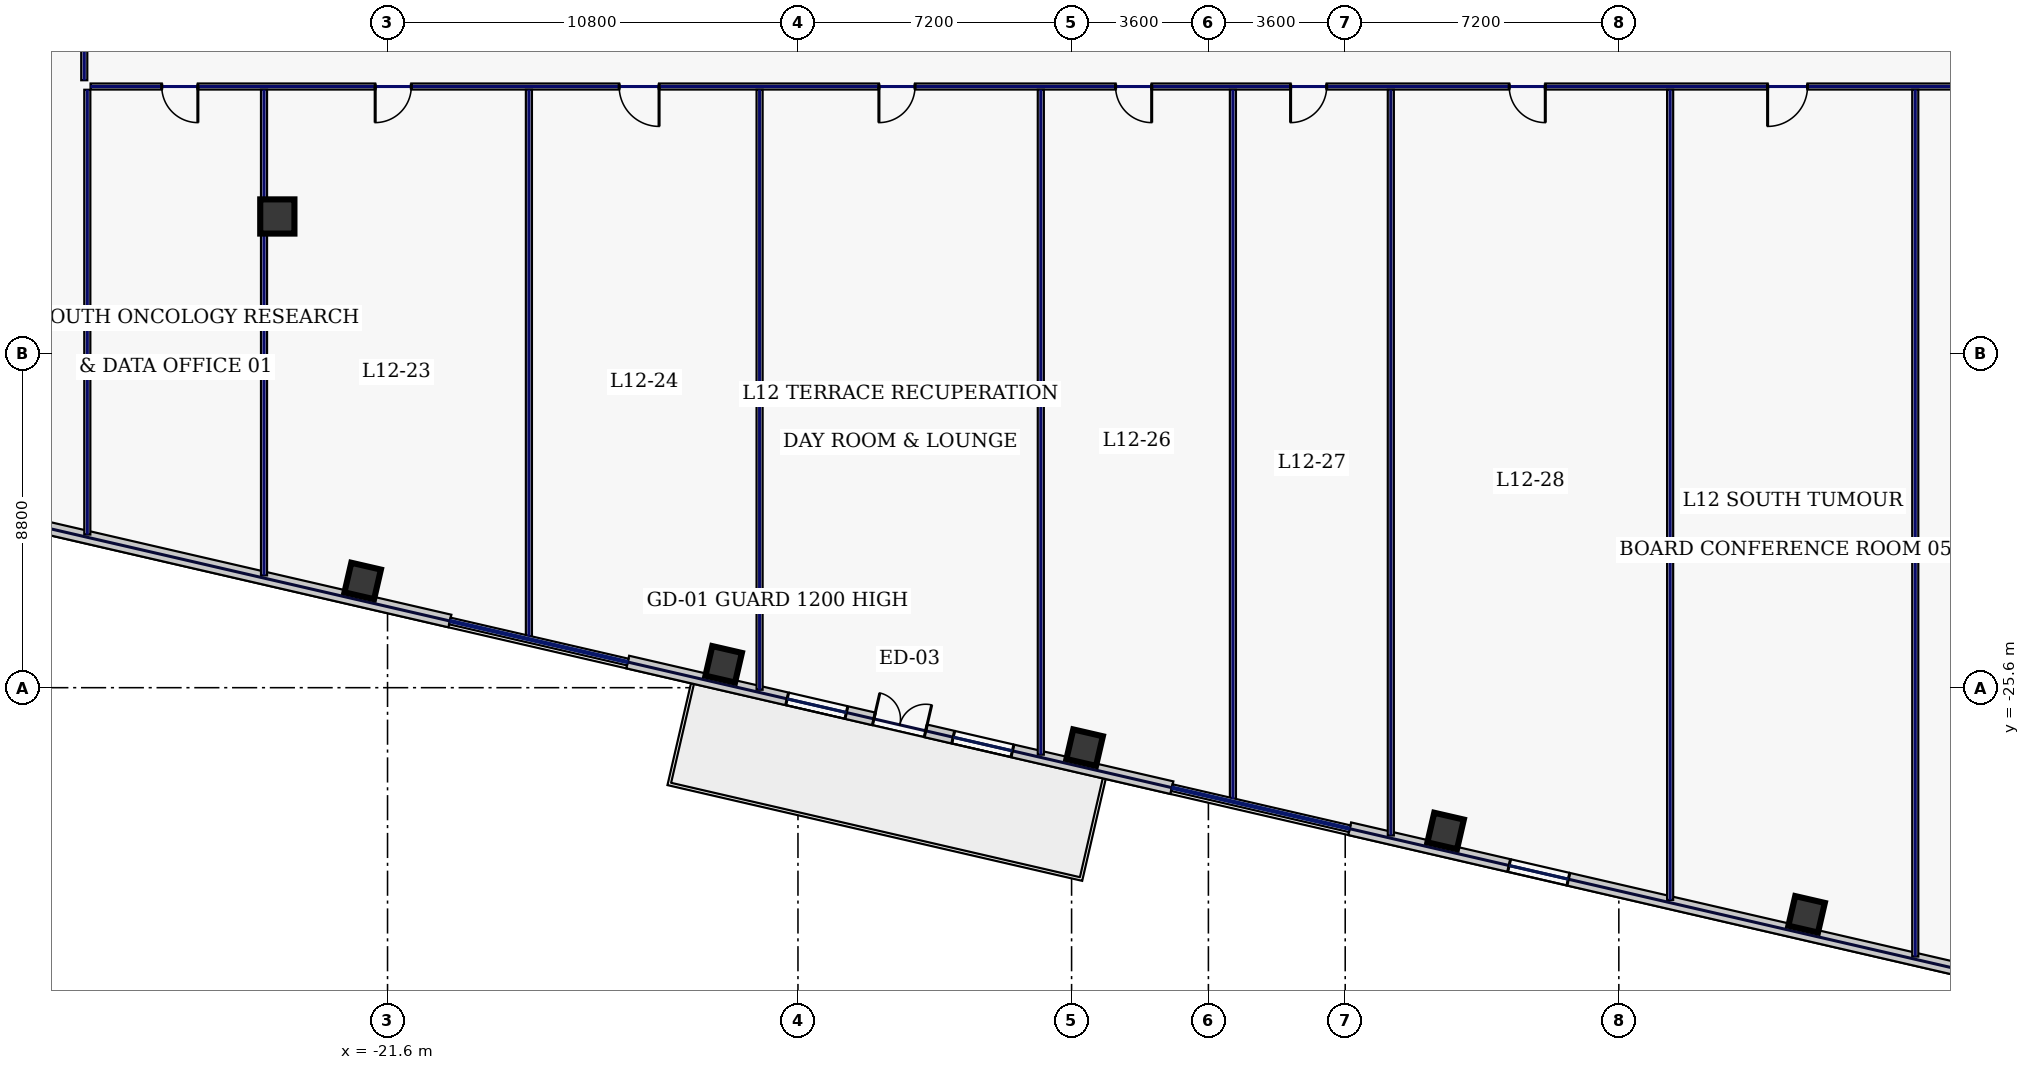
"""IFC4 building model, lengths in metres.
Left out: names, types, materials, properties, quantities, classifications, styles, units other than length and angle.
Written with IfcOpenShell. Run it as: python <this file> out.ifc"""

import sys

from ifc_helpers import new_model, si_unit, direction, frame, frame_2d, origin, origin_2d, place, context, subcontext, project, spatial, rectangle, hollow_rectangle, extrude, element, fill, save


model = new_model("IFC4")
c1 = context("Model", 3, precision=1e-05, world=origin(), true_north=direction((0.0, 1.0)))
c2 = subcontext(c1, "Body", "Model", "MODEL_VIEW")
j1 = project(units=[si_unit("LENGTHUNIT", "METRE"), si_unit("PLANEANGLEUNIT", "RADIAN")], contexts=[c1])
p1 = place(None, origin())
s1 = spatial("IfcSite", under=j1, at=p1, CompositionType="ELEMENT")
p2 = place(p1, origin())
s2 = spatial("IfcBuilding", under=s1, at=p2, CompositionType="ELEMENT")
p3 = place(p2, frame((0.0, 0.0, 59.4)))
s3 = spatial("IfcBuildingStorey", under=s2, at=p3, CompositionType="ELEMENT", Elevation=59.4)
p4 = place(p3, frame((-24.5, -13.2, 0.0), z_axis=(0.0, 0.0, 1.0), x_axis=(1.0, 0.0, 0.0)))
e1 = element("IfcColumn", 1, at=p4, inside=s3, PredefinedType="COLUMN", context=c2, shape_type="SweptSolid", body=[
    extrude(hollow_rectangle(XDim=0.9, YDim=0.9, WallThickness=0.04, at=origin_2d()), origin(), (0.0, 0.0, 1.0), 3.74),
])
for number, where, z_axis, x_axis in (
    (2, (-22.254, -22.792, 0.0), (0.0, 0.0, 1.0), (0.974, -0.225, 0.0)),
    (3, (-12.755, -24.985, 0.0), (0.0, 0.0, 1.0), (0.974, -0.225, 0.0)),
    (4, (-3.256, -27.178, 0.0), (0.0, 0.0, 1.0), (0.974, -0.225, 0.0)),
    (5, (6.242, -29.371, 0.0), (0.0, 0.0, 1.0), (0.974, -0.225, 0.0)),
    (6, (15.741, -31.564, 0.0), (0.0, 0.0, 1.0), (0.974, -0.225, 0.0)),
):
    element("IfcColumn", number, at=place(p3, frame(where, z_axis=z_axis, x_axis=x_axis)), inside=s3, PredefinedType="COLUMN", context=c2, shape_type="SweptSolid", body=[
        extrude(hollow_rectangle(XDim=0.8, YDim=0.8, WallThickness=0.036, at=origin_2d()), origin(), (0.0, 0.0, 1.0), 3.74),
    ])
p5 = place(p3, frame((-42.029, -18.75, 0.0), z_axis=(0.0, 0.0, 1.0), x_axis=(0.97436993772, -0.224951604723, 0.0)))
e7 = element("IfcWall", 7, at=p5, inside=s3, PredefinedType="STANDARD", context=c2, shape_type="SweptSolid", body=[
    extrude(rectangle(XDim=22.651, YDim=0.34, at=frame_2d((11.326, 0.0))), origin(), (0.0, 0.0, 1.0), 3.74),
])
p6 = place(p5, frame((2.512, 0.0, 0.22)))
e8 = element("IfcOpeningElement", 8, at=p6, cuts=e7, PredefinedType="OPENING", context=c2, shape_type="SweptSolid", body=[
    extrude(rectangle(XDim=1.6, YDim=1.2, at=frame_2d((0.8, 0.6))), frame((0.0, 0.18, 0.0), z_axis=(0.0, -1.0, 0.0), x_axis=(1.0, 0.0, 0.0)), (0.0, 0.0, 1.0), 0.36),
])
p7 = place(p5, frame((6.997, 0.0, 0.22)))
e9 = element("IfcOpeningElement", 9, at=p7, cuts=e7, PredefinedType="OPENING", context=c2, shape_type="SweptSolid", body=[
    extrude(rectangle(XDim=1.6, YDim=1.2, at=frame_2d((0.8, 0.6))), frame((0.0, 0.18, 0.0), z_axis=(0.0, -1.0, 0.0), x_axis=(1.0, 0.0, 0.0)), (0.0, 0.0, 1.0), 0.36),
])
p8 = place(p3, frame((-15.281, -24.925, 0.0), z_axis=(0.0, 0.0, 1.0), x_axis=(0.974370193991, -0.22495049469, 0.0)))
e10 = element("IfcWall", 10, at=p8, inside=s3, PredefinedType="STANDARD", context=c2, shape_type="SweptSolid", body=[
    extrude(rectangle(XDim=14.697, YDim=0.34, at=frame_2d((7.349, 0.0))), origin(), (0.0, 0.0, 1.0), 3.74),
])
p9 = place(p8, frame((6.649, 0.0, 0.0)))
e11 = element("IfcOpeningElement", 11, at=p9, cuts=e10, PredefinedType="OPENING", context=c2, shape_type="SweptSolid", body=[
    extrude(rectangle(XDim=1.4, YDim=2.2, at=frame_2d((0.7, 1.1))), frame((0.0, 0.18, 0.0), z_axis=(0.0, -1.0, 0.0), x_axis=(1.0, 0.0, 0.0)), (0.0, 0.0, 1.0), 0.36),
])
p10 = place(p8, frame((4.306, 0.0, 0.22)))
e12 = element("IfcOpeningElement", 12, at=p10, cuts=e10, PredefinedType="OPENING", context=c2, shape_type="SweptSolid", body=[
    extrude(rectangle(XDim=1.6, YDim=1.2, at=frame_2d((0.8, 0.6))), frame((0.0, 0.18, 0.0), z_axis=(0.0, -1.0, 0.0), x_axis=(1.0, 0.0, 0.0)), (0.0, 0.0, 1.0), 0.36),
])
p11 = place(p8, frame((8.791, 0.0, 0.22)))
e13 = element("IfcOpeningElement", 13, at=p11, cuts=e10, PredefinedType="OPENING", context=c2, shape_type="SweptSolid", body=[
    extrude(rectangle(XDim=1.6, YDim=1.2, at=frame_2d((0.8, 0.6))), frame((0.0, 0.18, 0.0), z_axis=(0.0, -1.0, 0.0), x_axis=(1.0, 0.0, 0.0)), (0.0, 0.0, 1.0), 0.36),
])
p12 = place(p3, frame((3.717, -29.311, 0.0), z_axis=(0.0, 0.0, 1.0), x_axis=(0.97436993772, -0.224951604723, 0.0)))
e14 = element("IfcWall", 14, at=p12, inside=s3, PredefinedType="STANDARD", context=c2, shape_type="SweptSolid", body=[
    extrude(rectangle(XDim=22.651, YDim=0.34, at=frame_2d((11.326, 0.0))), origin(), (0.0, 0.0, 1.0), 3.74),
])
p13 = place(p12, frame((4.306, 0.0, 0.22)))
e15 = element("IfcOpeningElement", 15, at=p13, cuts=e14, PredefinedType="OPENING", context=c2, shape_type="SweptSolid", body=[
    extrude(rectangle(XDim=1.6, YDim=1.2, at=frame_2d((0.8, 0.6))), frame((0.0, 0.18, 0.0), z_axis=(0.0, -1.0, 0.0), x_axis=(1.0, 0.0, 0.0)), (0.0, 0.0, 1.0), 0.36),
])
p14 = place(p12, frame((18.539, 0.0, 0.22)))
e16 = element("IfcOpeningElement", 16, at=p14, cuts=e14, PredefinedType="OPENING", context=c2, shape_type="SweptSolid", body=[
    extrude(rectangle(XDim=1.6, YDim=1.2, at=frame_2d((0.8, 0.6))), frame((0.0, 0.18, 0.0), z_axis=(0.0, -1.0, 0.0), x_axis=(1.0, 0.0, 0.0)), (0.0, 0.0, 1.0), 0.36),
])
p15 = place(p3, frame((-29.58, -9.615, 0.0), z_axis=(0.0, 0.0, 1.0), x_axis=(0.0, 1.0, 0.0)))
e17 = element("IfcWall", 17, at=p15, inside=s3, PredefinedType="PARTITIONING", context=c2, shape_type="SweptSolid", body=[
    extrude(rectangle(XDim=19.28, YDim=0.16, at=frame_2d((9.64, 0.0))), origin(), (0.0, 0.0, 1.0), 3.74),
])
p16 = place(p15, frame((1.969, 0.0, 0.0)))
e18 = element("IfcOpeningElement", 18, at=p16, cuts=e17, PredefinedType="OPENING", context=c2, shape_type="SweptSolid", body=[
    extrude(rectangle(XDim=0.95, YDim=2.2, at=frame_2d((0.475, 1.1))), frame((0.0, 0.09, 0.0), z_axis=(0.0, -1.0, 0.0), x_axis=(1.0, 0.0, 0.0)), (0.0, 0.0, 1.0), 0.18),
])
p17 = place(p15, frame((6.625, 0.0, 0.0)))
e19 = element("IfcOpeningElement", 19, at=p17, cuts=e17, PredefinedType="OPENING", context=c2, shape_type="SweptSolid", body=[
    extrude(rectangle(XDim=0.95, YDim=2.2, at=frame_2d((0.475, 1.1))), frame((0.0, 0.09, 0.0), z_axis=(0.0, -1.0, 0.0), x_axis=(1.0, 0.0, 0.0)), (0.0, 0.0, 1.0), 0.18),
])
p18 = place(p15, frame((11.825, 0.0, 0.0)))
e20 = element("IfcOpeningElement", 20, at=p18, cuts=e17, PredefinedType="OPENING", context=c2, shape_type="SweptSolid", body=[
    extrude(rectangle(XDim=0.95, YDim=2.2, at=frame_2d((0.475, 1.1))), frame((0.0, 0.09, 0.0), z_axis=(0.0, -1.0, 0.0), x_axis=(1.0, 0.0, 0.0)), (0.0, 0.0, 1.0), 0.18),
])
p19 = place(p15, frame((16.506, 0.0, 0.0)))
e21 = element("IfcOpeningElement", 21, at=p19, cuts=e17, PredefinedType="OPENING", context=c2, shape_type="SweptSolid", body=[
    extrude(rectangle(XDim=0.95, YDim=2.2, at=frame_2d((0.475, 1.1))), frame((0.0, 0.09, 0.0), z_axis=(0.0, -1.0, 0.0), x_axis=(1.0, 0.0, 0.0)), (0.0, 0.0, 1.0), 0.18),
])
p20 = place(p3, frame((29.415, -9.78, 0.0), z_axis=(0.0, 0.0, 1.0), x_axis=(-1.0, 0.0, 0.0)))
e22 = element("IfcWall", 22, at=p20, inside=s3, PredefinedType="PARTITIONING", context=c2, shape_type="SweptSolid", body=[
    extrude(rectangle(XDim=58.83, YDim=0.16, at=frame_2d((29.415, 0.0))), origin(), (0.0, 0.0, 1.0), 3.74),
])
p21 = place(p20, frame((56.006, 0.0, 0.0)))
e23 = element("IfcOpeningElement", 23, at=p21, cuts=e22, PredefinedType="OPENING", context=c2, shape_type="SweptSolid", body=[
    extrude(rectangle(XDim=0.95, YDim=2.2, at=frame_2d((0.475, 1.1))), frame((0.0, 0.09, 0.0), z_axis=(0.0, -1.0, 0.0), x_axis=(1.0, 0.0, 0.0)), (0.0, 0.0, 1.0), 0.18),
])
p22 = place(p20, frame((50.39, 0.0, 0.0)))
e24 = element("IfcOpeningElement", 24, at=p22, cuts=e22, PredefinedType="OPENING", context=c2, shape_type="SweptSolid", body=[
    extrude(rectangle(XDim=0.95, YDim=2.2, at=frame_2d((0.475, 1.1))), frame((0.0, 0.09, 0.0), z_axis=(0.0, -1.0, 0.0), x_axis=(1.0, 0.0, 0.0)), (0.0, 0.0, 1.0), 0.18),
])
p23 = place(p20, frame((43.87, 0.0, 0.0)))
e25 = element("IfcOpeningElement", 25, at=p23, cuts=e22, PredefinedType="OPENING", context=c2, shape_type="SweptSolid", body=[
    extrude(rectangle(XDim=1.05, YDim=2.2, at=frame_2d((0.525, 1.1))), frame((0.0, 0.09, 0.0), z_axis=(0.0, -1.0, 0.0), x_axis=(1.0, 0.0, 0.0)), (0.0, 0.0, 1.0), 0.18),
])
p24 = place(p20, frame((37.135, 0.0, 0.0)))
e26 = element("IfcOpeningElement", 26, at=p24, cuts=e22, PredefinedType="OPENING", context=c2, shape_type="SweptSolid", body=[
    extrude(rectangle(XDim=0.95, YDim=2.2, at=frame_2d((0.475, 1.1))), frame((0.0, 0.09, 0.0), z_axis=(0.0, -1.0, 0.0), x_axis=(1.0, 0.0, 0.0)), (0.0, 0.0, 1.0), 0.18),
])
p25 = place(p20, frame((30.907, 0.0, 0.0)))
e27 = element("IfcOpeningElement", 27, at=p25, cuts=e22, PredefinedType="OPENING", context=c2, shape_type="SweptSolid", body=[
    extrude(rectangle(XDim=0.95, YDim=2.2, at=frame_2d((0.475, 1.1))), frame((0.0, 0.09, 0.0), z_axis=(0.0, -1.0, 0.0), x_axis=(1.0, 0.0, 0.0)), (0.0, 0.0, 1.0), 0.18),
])
p26 = place(p20, frame((26.302, 0.0, 0.0)))
e28 = element("IfcOpeningElement", 28, at=p26, cuts=e22, PredefinedType="OPENING", context=c2, shape_type="SweptSolid", body=[
    extrude(rectangle(XDim=0.95, YDim=2.2, at=frame_2d((0.475, 1.1))), frame((0.0, 0.09, 0.0), z_axis=(0.0, -1.0, 0.0), x_axis=(1.0, 0.0, 0.0)), (0.0, 0.0, 1.0), 0.18),
])
p27 = place(p20, frame((20.55, 0.0, 0.0)))
e29 = element("IfcOpeningElement", 29, at=p27, cuts=e22, PredefinedType="OPENING", context=c2, shape_type="SweptSolid", body=[
    extrude(rectangle(XDim=0.95, YDim=2.2, at=frame_2d((0.475, 1.1))), frame((0.0, 0.09, 0.0), z_axis=(0.0, -1.0, 0.0), x_axis=(1.0, 0.0, 0.0)), (0.0, 0.0, 1.0), 0.18),
])
p28 = place(p20, frame((13.65, 0.0, 0.0)))
e30 = element("IfcOpeningElement", 30, at=p28, cuts=e22, PredefinedType="OPENING", context=c2, shape_type="SweptSolid", body=[
    extrude(rectangle(XDim=1.05, YDim=2.2, at=frame_2d((0.525, 1.1))), frame((0.0, 0.09, 0.0), z_axis=(0.0, -1.0, 0.0), x_axis=(1.0, 0.0, 0.0)), (0.0, 0.0, 1.0), 0.18),
])
p29 = place(p20, frame((7.3, 0.0, 0.0)))
e31 = element("IfcOpeningElement", 31, at=p29, cuts=e22, PredefinedType="OPENING", context=c2, shape_type="SweptSolid", body=[
    extrude(rectangle(XDim=0.95, YDim=2.2, at=frame_2d((0.475, 1.1))), frame((0.0, 0.09, 0.0), z_axis=(0.0, -1.0, 0.0), x_axis=(1.0, 0.0, 0.0)), (0.0, 0.0, 1.0), 0.18),
])
p30 = place(p20, frame((2.044, 0.0, 0.0)))
e32 = element("IfcOpeningElement", 32, at=p30, cuts=e22, PredefinedType="OPENING", context=c2, shape_type="SweptSolid", body=[
    extrude(rectangle(XDim=1.15, YDim=2.2, at=frame_2d((0.575, 1.1))), frame((0.0, 0.09, 0.0), z_axis=(0.0, -1.0, 0.0), x_axis=(1.0, 0.0, 0.0)), (0.0, 0.0, 1.0), 0.18),
])
p31 = place(p3, frame((-29.5, -21.571, 0.0), z_axis=(0.0, 0.0, 1.0), x_axis=(0.0, 1.0, 0.0)))
e33 = element("IfcWall", 33, at=p31, inside=s3, PredefinedType="PARTITIONING", context=c2, shape_type="SweptSolid", body=[
    extrude(rectangle(XDim=11.706, YDim=0.16, at=frame_2d((5.853, 0.0))), origin(), (0.0, 0.0, 1.0), 3.74),
])
p32 = place(p3, frame((-24.85, -22.644, 0.0), z_axis=(0.0, 0.0, 1.0), x_axis=(0.0, 1.0, 0.0)))
e34 = element("IfcWall", 34, at=p32, inside=s3, PredefinedType="PARTITIONING", context=c2, shape_type="SweptSolid", body=[
    extrude(rectangle(XDim=12.779, YDim=0.16, at=frame_2d((6.39, 0.0))), origin(), (0.0, 0.0, 1.0), 3.74),
])
p33 = place(p3, frame((-11.81, -25.655, 0.0), z_axis=(0.0, 0.0, 1.0), x_axis=(0.0, 1.0, 0.0)))
e35 = element("IfcWall", 35, at=p33, inside=s3, PredefinedType="PARTITIONING", context=c2, shape_type="SweptSolid", body=[
    extrude(rectangle(XDim=15.79, YDim=0.16, at=frame_2d((7.895, 0.0))), origin(), (0.0, 0.0, 1.0), 3.74),
])
p34 = place(p3, frame((-4.41, -27.363, 0.0), z_axis=(0.0, 0.0, 1.0), x_axis=(0.0, 1.0, 0.0)))
e36 = element("IfcWall", 36, at=p34, inside=s3, PredefinedType="PARTITIONING", context=c2, shape_type="SweptSolid", body=[
    extrude(rectangle(XDim=17.498, YDim=0.16, at=frame_2d((8.749, 0.0))), origin(), (0.0, 0.0, 1.0), 3.74),
])
p35 = place(p3, frame((4.8, -29.489, 0.0), z_axis=(0.0, 0.0, 1.0), x_axis=(0.0, 1.0, 0.0)))
e37 = element("IfcWall", 37, at=p35, inside=s3, PredefinedType="PARTITIONING", context=c2, shape_type="SweptSolid", body=[
    extrude(rectangle(XDim=19.624, YDim=0.16, at=frame_2d((9.812, 0.0))), origin(), (0.0, 0.0, 1.0), 3.235),
])
p36 = place(p3, frame((18.6, -32.675, 0.0), z_axis=(0.0, 0.0, 1.0), x_axis=(0.0, 1.0, 0.0)))
e38 = element("IfcWall", 38, at=p36, inside=s3, PredefinedType="PARTITIONING", context=c2, shape_type="SweptSolid", body=[
    extrude(rectangle(XDim=22.81, YDim=0.16, at=frame_2d((11.405, 0.0))), origin(), (0.0, 0.0, 1.0), 3.74),
])
p37 = place(p3, frame((-17.88, -24.253, 0.0), z_axis=(0.0, 0.0, 1.0), x_axis=(0.0, 1.0, 0.0)))
e39 = element("IfcWall", 39, at=p37, inside=s3, PredefinedType="PARTITIONING", context=c2, shape_type="SweptSolid", body=[
    extrude(rectangle(XDim=14.388, YDim=0.16, at=frame_2d((7.194, 0.0))), origin(), (0.0, 0.0, 1.0), 3.74),
])
p38 = place(p3, frame((0.645, -28.53, 0.0), z_axis=(0.0, 0.0, 1.0), x_axis=(0.0, 1.0, 0.0)))
e40 = element("IfcWall", 40, at=p38, inside=s3, PredefinedType="PARTITIONING", context=c2, shape_type="SweptSolid", body=[
    extrude(rectangle(XDim=18.665, YDim=0.16, at=frame_2d((9.333, 0.0))), origin(), (0.0, 0.0, 1.0), 3.74),
])
p39 = place(p3, frame((12.15, -31.186, 0.0), z_axis=(0.0, 0.0, 1.0), x_axis=(0.0, 1.0, 0.0)))
e41 = element("IfcWall", 41, at=p39, inside=s3, PredefinedType="PARTITIONING", context=c2, shape_type="SweptSolid", body=[
    extrude(rectangle(XDim=21.321, YDim=0.16, at=frame_2d((10.661, 0.0))), origin(), (0.0, 0.0, 1.0), 3.74),
])
p40 = place(p9, origin())
e42 = element("IfcDoor", 42, at=p40, inside=s3, OperationType="DOUBLE_SWING_LEFT", PredefinedType="DOOR", context=c2, shape_type="SweptSolid", body=[
    extrude(rectangle(XDim=1.4, YDim=2.2, at=frame_2d((0.7, 1.1))), frame((0.0, 0.025, 0.0), z_axis=(0.0, -1.0, 0.0), x_axis=(1.0, 0.0, 0.0)), (0.0, 0.0, 1.0), 0.05),
])
fill(e11, e42)
p41 = place(p10, origin())
e43 = element("IfcWindow", 43, at=p41, inside=s3, PartitioningType="SINGLE_PANEL", PredefinedType="WINDOW", context=c2, shape_type="SweptSolid", body=[
    extrude(rectangle(XDim=1.6, YDim=1.2, at=frame_2d((0.8, 0.6))), frame((0.0, 0.03, 0.0), z_axis=(0.0, -1.0, 0.0), x_axis=(1.0, 0.0, 0.0)), (0.0, 0.0, 1.0), 0.06),
])
fill(e12, e43)
p42 = place(p11, origin())
e44 = element("IfcWindow", 44, at=p42, inside=s3, PartitioningType="SINGLE_PANEL", PredefinedType="WINDOW", context=c2, shape_type="SweptSolid", body=[
    extrude(rectangle(XDim=1.6, YDim=1.2, at=frame_2d((0.8, 0.6))), frame((0.0, 0.03, 0.0), z_axis=(0.0, -1.0, 0.0), x_axis=(1.0, 0.0, 0.0)), (0.0, 0.0, 1.0), 0.06),
])
fill(e13, e44)
p43 = place(p13, origin())
e45 = element("IfcWindow", 45, at=p43, inside=s3, PartitioningType="SINGLE_PANEL", PredefinedType="WINDOW", context=c2, shape_type="SweptSolid", body=[
    extrude(rectangle(XDim=1.6, YDim=1.2, at=frame_2d((0.8, 0.6))), frame((0.0, 0.03, 0.0), z_axis=(0.0, -1.0, 0.0), x_axis=(1.0, 0.0, 0.0)), (0.0, 0.0, 1.0), 0.06),
])
fill(e15, e45)
p44 = place(p21, origin())
e46 = element("IfcDoor", 46, at=p44, inside=s3, OperationType="SINGLE_SWING_LEFT", PredefinedType="DOOR", context=c2, shape_type="SweptSolid", body=[
    extrude(rectangle(XDim=0.95, YDim=2.2, at=frame_2d((0.475, 1.1))), frame((0.0, 0.025, 0.0), z_axis=(0.0, -1.0, 0.0), x_axis=(1.0, 0.0, 0.0)), (0.0, 0.0, 1.0), 0.05),
])
fill(e23, e46)
p45 = place(p22, origin())
e47 = element("IfcDoor", 47, at=p45, inside=s3, OperationType="SINGLE_SWING_RIGHT", PredefinedType="DOOR", context=c2, shape_type="SweptSolid", body=[
    extrude(rectangle(XDim=0.95, YDim=2.2, at=frame_2d((0.475, 1.1))), frame((0.0, 0.025, 0.0), z_axis=(0.0, -1.0, 0.0), x_axis=(1.0, 0.0, 0.0)), (0.0, 0.0, 1.0), 0.05),
])
fill(e24, e47)
p46 = place(p23, origin())
e48 = element("IfcDoor", 48, at=p46, inside=s3, OperationType="SINGLE_SWING_LEFT", PredefinedType="DOOR", context=c2, shape_type="SweptSolid", body=[
    extrude(rectangle(XDim=1.05, YDim=2.2, at=frame_2d((0.525, 1.1))), frame((0.0, 0.025, 0.0), z_axis=(0.0, -1.0, 0.0), x_axis=(1.0, 0.0, 0.0)), (0.0, 0.0, 1.0), 0.05),
])
fill(e25, e48)
p47 = place(p24, origin())
e49 = element("IfcDoor", 49, at=p47, inside=s3, OperationType="SINGLE_SWING_RIGHT", PredefinedType="DOOR", context=c2, shape_type="SweptSolid", body=[
    extrude(rectangle(XDim=0.95, YDim=2.2, at=frame_2d((0.475, 1.1))), frame((0.0, 0.025, 0.0), z_axis=(0.0, -1.0, 0.0), x_axis=(1.0, 0.0, 0.0)), (0.0, 0.0, 1.0), 0.05),
])
fill(e26, e49)
p48 = place(p25, origin())
e50 = element("IfcDoor", 50, at=p48, inside=s3, OperationType="SINGLE_SWING_LEFT", PredefinedType="DOOR", context=c2, shape_type="SweptSolid", body=[
    extrude(rectangle(XDim=0.95, YDim=2.2, at=frame_2d((0.475, 1.1))), frame((0.0, 0.025, 0.0), z_axis=(0.0, -1.0, 0.0), x_axis=(1.0, 0.0, 0.0)), (0.0, 0.0, 1.0), 0.05),
])
fill(e27, e50)
p49 = place(p26, origin())
e51 = element("IfcDoor", 51, at=p49, inside=s3, OperationType="SINGLE_SWING_RIGHT", PredefinedType="DOOR", context=c2, shape_type="SweptSolid", body=[
    extrude(rectangle(XDim=0.95, YDim=2.2, at=frame_2d((0.475, 1.1))), frame((0.0, 0.025, 0.0), z_axis=(0.0, -1.0, 0.0), x_axis=(1.0, 0.0, 0.0)), (0.0, 0.0, 1.0), 0.05),
])
fill(e28, e51)
p50 = place(p27, origin())
e52 = element("IfcDoor", 52, at=p50, inside=s3, OperationType="SINGLE_SWING_LEFT", PredefinedType="DOOR", context=c2, shape_type="SweptSolid", body=[
    extrude(rectangle(XDim=0.95, YDim=2.2, at=frame_2d((0.475, 1.1))), frame((0.0, 0.025, 0.0), z_axis=(0.0, -1.0, 0.0), x_axis=(1.0, 0.0, 0.0)), (0.0, 0.0, 1.0), 0.05),
])
fill(e29, e52)
p51 = place(p28, origin())
e53 = element("IfcDoor", 53, at=p51, inside=s3, OperationType="SINGLE_SWING_RIGHT", PredefinedType="DOOR", context=c2, shape_type="SweptSolid", body=[
    extrude(rectangle(XDim=1.05, YDim=2.2, at=frame_2d((0.525, 1.1))), frame((0.0, 0.025, 0.0), z_axis=(0.0, -1.0, 0.0), x_axis=(1.0, 0.0, 0.0)), (0.0, 0.0, 1.0), 0.05),
])
fill(e30, e53)
save(model, sys.argv[1])
